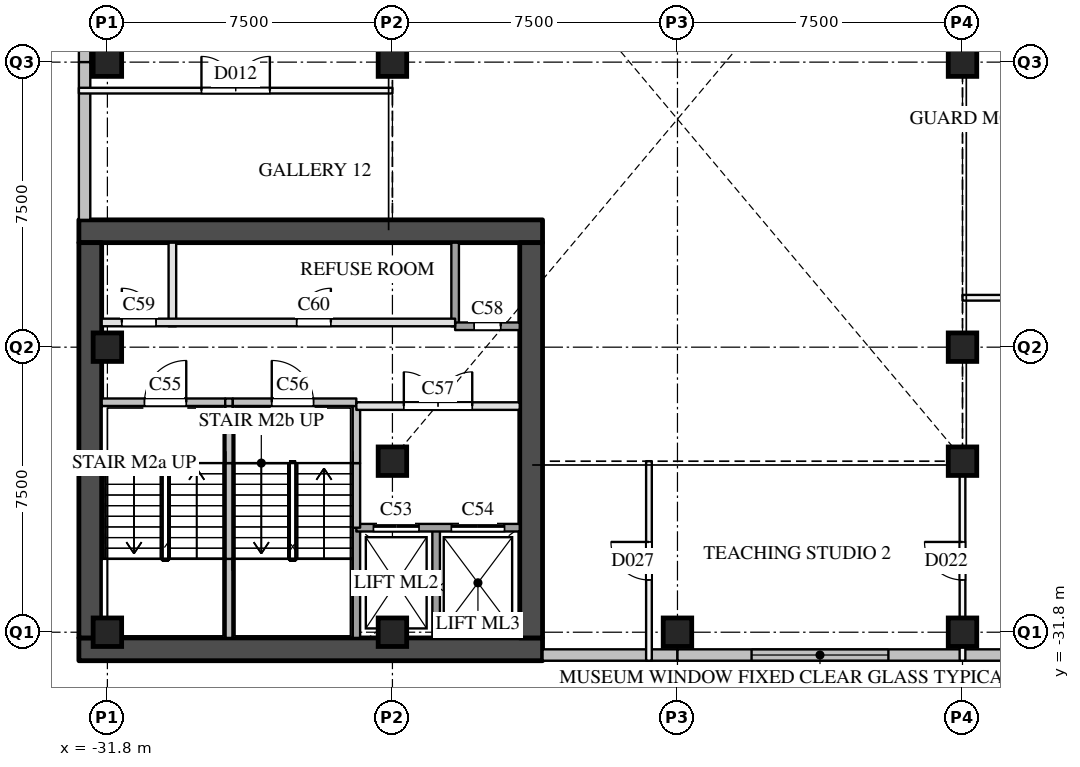
"""IFC4 building model, lengths in metres.
Left out: names, types, materials, properties, quantities, classifications, styles, units other than length and angle.
Written with IfcOpenShell. Run it as: python <this file> out.ifc"""

import sys

from ifc_helpers import new_model, si_unit, direction, frame, frame_2d, origin, origin_2d, place, context, subcontext, project, spatial, rectangle, extrude, element, fill, save


model = new_model("IFC4")
c1 = context("Model", 3, precision=1e-05, world=origin(), true_north=direction((0.0, 1.0)))
c2 = subcontext(c1, "Body", "Model", "MODEL_VIEW")
j1 = project(units=[si_unit("LENGTHUNIT", "METRE"), si_unit("PLANEANGLEUNIT", "RADIAN")], contexts=[c1])
p1 = place(None, origin())
s1 = spatial("IfcSite", under=j1, at=p1, CompositionType="ELEMENT")
p2 = place(p1, origin())
s2 = spatial("IfcBuilding", under=s1, at=p2, CompositionType="ELEMENT")
p3 = place(p2, frame((0.0, 0.0, 14.0)))
s3 = spatial("IfcBuildingStorey", under=s2, at=p3, CompositionType="ELEMENT", Elevation=14.0)
for number, where, z_axis, x_axis in (
    (1, (-31.8, -31.8, 0.0), (0.0, 0.0, 1.0), (1.0, 0.0, 0.0)),
    (2, (-31.8, -24.3, 0.0), (0.0, 0.0, 1.0), (1.0, 0.0, 0.0)),
    (3, (-31.8, -16.8, 0.0), (0.0, 0.0, 1.0), (1.0, 0.0, 0.0)),
    (4, (-24.3, -31.8, 0.0), (0.0, 0.0, 1.0), (1.0, 0.0, 0.0)),
    (5, (-24.3, -16.8, 0.0), (0.0, 0.0, 1.0), (1.0, 0.0, 0.0)),
    (6, (-16.8, -31.8, 0.0), (0.0, 0.0, 1.0), (1.0, 0.0, 0.0)),
    (7, (-9.3, -31.8, 0.0), (0.0, 0.0, 1.0), (1.0, 0.0, 0.0)),
    (8, (-9.3, -24.3, 0.0), (0.0, 0.0, 1.0), (1.0, 0.0, 0.0)),
    (9, (-9.3, -16.8, 0.0), (0.0, 0.0, 1.0), (1.0, 0.0, 0.0)),
    (10, (-24.3, -27.3, 0.0), (0.0, 0.0, 1.0), (1.0, 0.0, 0.0)),
    (11, (-9.3, -27.3, 0.0), (0.0, 0.0, 1.0), (1.0, 0.0, 0.0)),
):
    element("IfcColumn", number, at=place(p3, frame(where, z_axis=z_axis, x_axis=x_axis)), inside=s3, PredefinedType="COLUMN", context=c2, shape_type="SweptSolid", body=[
        extrude(rectangle(XDim=0.75, YDim=0.75, at=origin_2d()), origin(), (0.0, 0.0, 1.0), 7.0),
    ])
p4 = place(p3, frame((-20.35, -32.4, 0.0), z_axis=(0.0, 0.0, 1.0), x_axis=(1.0, 0.0, 0.0)))
e12 = element("IfcWall", 12, at=p4, inside=s3, PredefinedType="SOLIDWALL", context=c2, shape_type="SweptSolid", body=[
    extrude(rectangle(XDim=3.55, YDim=0.3, at=frame_2d((1.775, 0.0))), origin(), (0.0, 0.0, 1.0), 6.59),
])
p5 = place(p3, frame((-16.8, -32.4, 0.0), z_axis=(0.0, 0.0, 1.0), x_axis=(1.0, 0.0, 0.0)))
e13 = element("IfcWall", 13, at=p5, inside=s3, PredefinedType="SOLIDWALL", context=c2, shape_type="SweptSolid", body=[
    extrude(rectangle(XDim=7.5, YDim=0.3, at=frame_2d((3.75, 0.0))), origin(), (0.0, 0.0, 1.0), 6.59),
])
p6 = place(p5, frame((1.95, 0.0, 0.9)))
e14 = element("IfcOpeningElement", 14, at=p6, cuts=e13, PredefinedType="OPENING", context=c2, shape_type="SweptSolid", body=[
    extrude(rectangle(XDim=3.6, YDim=3.0, at=frame_2d((1.8, 1.5))), frame((0.0, 0.16, 0.0), z_axis=(0.0, -1.0, 0.0), x_axis=(1.0, 0.0, 0.0)), (0.0, 0.0, 1.0), 0.32),
])
p7 = place(p3, frame((-9.3, -32.4, 0.0), z_axis=(0.0, 0.0, 1.0), x_axis=(1.0, 0.0, 0.0)))
e15 = element("IfcWall", 15, at=p7, inside=s3, PredefinedType="SOLIDWALL", context=c2, shape_type="SweptSolid", body=[
    extrude(rectangle(XDim=7.5, YDim=0.3, at=frame_2d((3.75, 0.0))), origin(), (0.0, 0.0, 1.0), 6.59),
])
p8 = place(p7, frame((1.95, 0.0, 0.9)))
e16 = element("IfcOpeningElement", 16, at=p8, cuts=e15, PredefinedType="OPENING", context=c2, shape_type="SweptSolid", body=[
    extrude(rectangle(XDim=3.6, YDim=3.0, at=frame_2d((1.8, 1.5))), frame((0.0, 0.16, 0.0), z_axis=(0.0, -1.0, 0.0), x_axis=(1.0, 0.0, 0.0)), (0.0, 0.0, 1.0), 0.32),
])
p9 = place(p3, frame((-32.4, -9.3, 0.0), z_axis=(0.0, 0.0, 1.0), x_axis=(0.0, -1.0, 0.0)))
e17 = element("IfcWall", 17, at=p9, inside=s3, PredefinedType="SOLIDWALL", context=c2, shape_type="SweptSolid", body=[
    extrude(rectangle(XDim=7.5, YDim=0.3, at=frame_2d((3.75, 0.0))), origin(), (0.0, 0.0, 1.0), 6.59),
])
p10 = place(p9, frame((1.95, 0.0, 0.9)))
e18 = element("IfcOpeningElement", 18, at=p10, cuts=e17, PredefinedType="OPENING", context=c2, shape_type="SweptSolid", body=[
    extrude(rectangle(XDim=3.6, YDim=3.0, at=frame_2d((1.8, 1.5))), frame((0.0, 0.16, 0.0), z_axis=(0.0, -1.0, 0.0), x_axis=(1.0, 0.0, 0.0)), (0.0, 0.0, 1.0), 0.32),
])
p11 = place(p3, frame((-32.4, -16.8, 0.0), z_axis=(0.0, 0.0, 1.0), x_axis=(0.0, -1.0, 0.0)))
e19 = element("IfcWall", 19, at=p11, inside=s3, PredefinedType="SOLIDWALL", context=c2, shape_type="SweptSolid", body=[
    extrude(rectangle(XDim=4.15, YDim=0.3, at=frame_2d((2.075, 0.0))), origin(), (0.0, 0.0, 1.0), 6.59),
])
for number, where, z_axis, x_axis in (
    (20, (-32.55, -32.25, 0.0), (0.0, 0.0, 1.0), (1.0, 0.0, 0.0)),
    (21, (-32.55, -21.25, 0.0), (0.0, 0.0, 1.0), (1.0, 0.0, 0.0)),
):
    element("IfcWall", number, at=place(p3, frame(where, z_axis=z_axis, x_axis=x_axis)), inside=s3, PredefinedType="SHEAR", context=c2, shape_type="SweptSolid", body=[
        extrude(rectangle(XDim=12.2, YDim=0.6, at=frame_2d((6.1, 0.0))), origin(), (0.0, 0.0, 1.0), 6.59),
    ])
for number, where, z_axis, x_axis in (
    (22, (-32.25, -31.95, 0.0), (0.0, 0.0, 1.0), (0.0, 1.0, 0.0)),
    (23, (-20.65, -31.95, 0.0), (0.0, 0.0, 1.0), (0.0, 1.0, 0.0)),
):
    element("IfcWall", number, at=place(p3, frame(where, z_axis=z_axis, x_axis=x_axis)), inside=s3, PredefinedType="SHEAR", context=c2, shape_type="SweptSolid", body=[
        extrude(rectangle(XDim=10.4, YDim=0.6, at=frame_2d((5.2, 0.0))), origin(), (0.0, 0.0, 1.0), 6.59),
    ])
p12 = place(p3, frame((-30.09, -23.75, 0.0), z_axis=(0.0, 0.0, 1.0), x_axis=(0.0, 1.0, 0.0)))
e24 = element("IfcWall", 24, at=p12, inside=s3, PredefinedType="PARTITIONING", context=c2, shape_type="SweptSolid", body=[
    extrude(rectangle(XDim=2.2, YDim=0.2, at=frame_2d((1.1, 0.0))), origin(), (0.0, 0.0, 1.0), 6.59),
])
p13 = place(p3, frame((-28.6, -31.95, 0.0), z_axis=(0.0, 0.0, 1.0), x_axis=(0.0, 1.0, 0.0)))
e25 = element("IfcWall", 25, at=p13, inside=s3, PredefinedType="SOLIDWALL", context=c2, shape_type="SweptSolid", body=[
    extrude(rectangle(XDim=2.08, YDim=0.2, at=frame_2d((1.04, 0.0))), origin(), (0.0, 0.0, 1.0), 6.59),
])
p14 = place(p3, frame((-28.6, -29.87, 0.0), z_axis=(0.0, 0.0, 1.0), x_axis=(0.0, 1.0, 0.0)))
e26 = element("IfcWall", 26, at=p14, inside=s3, PredefinedType="SOLIDWALL", context=c2, shape_type="SweptSolid", body=[
    extrude(rectangle(XDim=2.52, YDim=0.2, at=frame_2d((1.26, 0.0))), origin(), (0.0, 0.0, 1.0), 6.59),
])
p15 = place(p3, frame((-28.6, -27.35, 0.0), z_axis=(0.0, 0.0, 1.0), x_axis=(0.0, 1.0, 0.0)))
e27 = element("IfcWall", 27, at=p15, inside=s3, PredefinedType="SOLIDWALL", context=c2, shape_type="SweptSolid", body=[
    extrude(rectangle(XDim=1.6, YDim=0.2, at=frame_2d((0.8, 0.0))), origin(), (0.0, 0.0, 1.0), 6.59),
])
p16 = place(p3, frame((-25.25, -31.95, 0.0), z_axis=(0.0, 0.0, 1.0), x_axis=(0.0, 1.0, 0.0)))
e28 = element("IfcWall", 28, at=p16, inside=s3, PredefinedType="SOLIDWALL", context=c2, shape_type="SweptSolid", body=[
    extrude(rectangle(XDim=2.9, YDim=0.2, at=frame_2d((1.45, 0.0))), origin(), (0.0, 0.0, 1.0), 6.59),
])
p17 = place(p3, frame((-25.25, -29.05, 0.0), z_axis=(0.0, 0.0, 1.0), x_axis=(0.0, 1.0, 0.0)))
e29 = element("IfcWall", 29, at=p17, inside=s3, PredefinedType="SOLIDWALL", context=c2, shape_type="SweptSolid", body=[
    extrude(rectangle(XDim=1.7, YDim=0.2, at=frame_2d((0.85, 0.0))), origin(), (0.0, 0.0, 1.0), 6.59),
])
p18 = place(p3, frame((-25.25, -27.35, 0.0), z_axis=(0.0, 0.0, 1.0), x_axis=(0.0, 1.0, 0.0)))
e30 = element("IfcWall", 30, at=p18, inside=s3, PredefinedType="SOLIDWALL", context=c2, shape_type="SweptSolid", body=[
    extrude(rectangle(XDim=1.6, YDim=0.2, at=frame_2d((0.8, 0.0))), origin(), (0.0, 0.0, 1.0), 6.59),
])
p19 = place(p3, frame((-23.15, -31.95, 0.0), z_axis=(0.0, 0.0, 1.0), x_axis=(0.0, 1.0, 0.0)))
e31 = element("IfcWall", 31, at=p19, inside=s3, PredefinedType="SOLIDWALL", context=c2, shape_type="SweptSolid", body=[
    extrude(rectangle(XDim=2.9, YDim=0.2, at=frame_2d((1.45, 0.0))), origin(), (0.0, 0.0, 1.0), 6.59),
])
p20 = place(p3, frame((-22.65, -23.75, 0.0), z_axis=(0.0, 0.0, 1.0), x_axis=(0.0, 1.0, 0.0)))
e32 = element("IfcWall", 32, at=p20, inside=s3, PredefinedType="SOLIDWALL", context=c2, shape_type="SweptSolid", body=[
    extrude(rectangle(XDim=2.2, YDim=0.2, at=frame_2d((1.1, 0.0))), origin(), (0.0, 0.0, 1.0), 6.59),
])
p21 = place(p3, frame((-25.25, -29.05, 0.0), z_axis=(0.0, 0.0, 1.0), x_axis=(1.0, 0.0, 0.0)))
e33 = element("IfcWall", 33, at=p21, inside=s3, PredefinedType="SOLIDWALL", context=c2, shape_type="SweptSolid", body=[
    extrude(rectangle(XDim=4.3, YDim=0.2, at=frame_2d((2.15, 0.0))), origin(), (0.0, 0.0, 1.0), 6.59),
])
p22 = place(p21, frame((0.45, 0.0, 0.0)))
e34 = element("IfcOpeningElement", 34, at=p22, cuts=e33, PredefinedType="OPENING", context=c2, shape_type="SweptSolid", body=[
    extrude(rectangle(XDim=1.2, YDim=2.1, at=frame_2d((0.6, 1.05))), frame((0.0, 0.11, 0.0), z_axis=(0.0, -1.0, 0.0), x_axis=(1.0, 0.0, 0.0)), (0.0, 0.0, 1.0), 0.22),
])
p23 = place(p21, frame((2.5, 0.0, 0.0)))
e35 = element("IfcOpeningElement", 35, at=p23, cuts=e33, PredefinedType="OPENING", context=c2, shape_type="SweptSolid", body=[
    extrude(rectangle(XDim=1.4, YDim=2.1, at=frame_2d((0.7, 1.05))), frame((0.0, 0.11, 0.0), z_axis=(0.0, -1.0, 0.0), x_axis=(1.0, 0.0, 0.0)), (0.0, 0.0, 1.0), 0.22),
])
p24 = place(p3, frame((-25.25, -25.85, 0.0), z_axis=(0.0, 0.0, 1.0), x_axis=(1.0, 0.0, 0.0)))
e36 = element("IfcWall", 36, at=p24, inside=s3, PredefinedType="PARTITIONING", context=c2, shape_type="SweptSolid", body=[
    extrude(rectangle(XDim=4.3, YDim=0.2, at=frame_2d((2.15, 0.0))), origin(), (0.0, 0.0, 1.0), 6.59),
])
p25 = place(p24, frame((1.25, 0.0, 0.0)))
e37 = element("IfcOpeningElement", 37, at=p25, cuts=e36, PredefinedType="OPENING", context=c2, shape_type="SweptSolid", body=[
    extrude(rectangle(XDim=1.8, YDim=2.1, at=frame_2d((0.9, 1.05))), frame((0.0, 0.11, 0.0), z_axis=(0.0, -1.0, 0.0), x_axis=(1.0, 0.0, 0.0)), (0.0, 0.0, 1.0), 0.22),
])
p26 = place(p3, frame((-31.95, -25.75, 0.0), z_axis=(0.0, 0.0, 1.0), x_axis=(1.0, 0.0, 0.0)))
e38 = element("IfcWall", 38, at=p26, inside=s3, PredefinedType="SOLIDWALL", context=c2, shape_type="SweptSolid", body=[
    extrude(rectangle(XDim=3.25, YDim=0.2, at=frame_2d((1.625, 0.0))), origin(), (0.0, 0.0, 1.0), 6.59),
])
p27 = place(p26, frame((1.125, 0.0, 0.0)))
e39 = element("IfcOpeningElement", 39, at=p27, cuts=e38, PredefinedType="OPENING", context=c2, shape_type="SweptSolid", body=[
    extrude(rectangle(XDim=1.1, YDim=2.1, at=frame_2d((0.55, 1.05))), frame((0.0, 0.11, 0.0), z_axis=(0.0, -1.0, 0.0), x_axis=(1.0, 0.0, 0.0)), (0.0, 0.0, 1.0), 0.22),
])
p28 = place(p3, frame((-28.7, -25.75, 0.0), z_axis=(0.0, 0.0, 1.0), x_axis=(1.0, 0.0, 0.0)))
e40 = element("IfcWall", 40, at=p28, inside=s3, PredefinedType="SOLIDWALL", context=c2, shape_type="SweptSolid", body=[
    extrude(rectangle(XDim=0.2, YDim=0.2, at=frame_2d((0.1, 0.0))), origin(), (0.0, 0.0, 1.0), 6.59),
])
p29 = place(p3, frame((-28.5, -25.75, 0.0), z_axis=(0.0, 0.0, 1.0), x_axis=(1.0, 0.0, 0.0)))
e41 = element("IfcWall", 41, at=p29, inside=s3, PredefinedType="SOLIDWALL", context=c2, shape_type="SweptSolid", body=[
    extrude(rectangle(XDim=3.25, YDim=0.2, at=frame_2d((1.625, 0.0))), origin(), (0.0, 0.0, 1.0), 6.59),
])
p30 = place(p29, frame((1.025, 0.0, 0.0)))
e42 = element("IfcOpeningElement", 42, at=p30, cuts=e41, PredefinedType="OPENING", context=c2, shape_type="SweptSolid", body=[
    extrude(rectangle(XDim=1.1, YDim=2.1, at=frame_2d((0.55, 1.05))), frame((0.0, 0.11, 0.0), z_axis=(0.0, -1.0, 0.0), x_axis=(1.0, 0.0, 0.0)), (0.0, 0.0, 1.0), 0.22),
])
p31 = place(p3, frame((-31.95, -23.65, 0.0), z_axis=(0.0, 0.0, 1.0), x_axis=(1.0, 0.0, 0.0)))
e43 = element("IfcWall", 43, at=p31, inside=s3, PredefinedType="PARTITIONING", context=c2, shape_type="SweptSolid", body=[
    extrude(rectangle(XDim=9.3, YDim=0.2, at=frame_2d((4.65, 0.0))), origin(), (0.0, 0.0, 1.0), 6.59),
])
p32 = place(p31, frame((0.53, 0.0, 0.0)))
e44 = element("IfcOpeningElement", 44, at=p32, cuts=e43, PredefinedType="OPENING", context=c2, shape_type="SweptSolid", body=[
    extrude(rectangle(XDim=0.9, YDim=2.1, at=frame_2d((0.45, 1.05))), frame((0.0, 0.11, 0.0), z_axis=(0.0, -1.0, 0.0), x_axis=(1.0, 0.0, 0.0)), (0.0, 0.0, 1.0), 0.22),
])
p33 = place(p31, frame((5.13, 0.0, 0.0)))
e45 = element("IfcOpeningElement", 45, at=p33, cuts=e43, PredefinedType="OPENING", context=c2, shape_type="SweptSolid", body=[
    extrude(rectangle(XDim=0.9, YDim=2.1, at=frame_2d((0.45, 1.05))), frame((0.0, 0.11, 0.0), z_axis=(0.0, -1.0, 0.0), x_axis=(1.0, 0.0, 0.0)), (0.0, 0.0, 1.0), 0.22),
])
p34 = place(p3, frame((-22.65, -23.75, 0.0), z_axis=(0.0, 0.0, 1.0), x_axis=(1.0, 0.0, 0.0)))
e46 = element("IfcWall", 46, at=p34, inside=s3, PredefinedType="SOLIDWALL", context=c2, shape_type="SweptSolid", body=[
    extrude(rectangle(XDim=1.7, YDim=0.2, at=frame_2d((0.85, 0.0))), origin(), (0.0, 0.0, 1.0), 6.59),
])
p35 = place(p34, frame((0.5, 0.0, 0.0)))
e47 = element("IfcOpeningElement", 47, at=p35, cuts=e46, PredefinedType="OPENING", context=c2, shape_type="SweptSolid", body=[
    extrude(rectangle(XDim=0.7, YDim=2.1, at=frame_2d((0.35, 1.05))), frame((0.0, 0.11, 0.0), z_axis=(0.0, -1.0, 0.0), x_axis=(1.0, 0.0, 0.0)), (0.0, 0.0, 1.0), 0.22),
])
p36 = place(p3, frame((-32.55, -17.55, 0.0), z_axis=(0.0, 0.0, 1.0), x_axis=(1.0, 0.0, 0.0)))
e48 = element("IfcWall", 48, at=p36, inside=s3, PredefinedType="PARTITIONING", context=c2, shape_type="SweptSolid", body=[
    extrude(rectangle(XDim=8.25, YDim=0.15, at=frame_2d((4.125, 0.0))), origin(), (0.0, 0.0, 1.0), 5.79),
])
p37 = place(p36, frame((3.225, 0.0, 0.0)))
e49 = element("IfcOpeningElement", 49, at=p37, cuts=e48, PredefinedType="OPENING", context=c2, shape_type="SweptSolid", body=[
    extrude(rectangle(XDim=1.8, YDim=2.1, at=frame_2d((0.9, 1.05))), frame((0.0, 0.085, 0.0), z_axis=(0.0, -1.0, 0.0), x_axis=(1.0, 0.0, 0.0)), (0.0, 0.0, 1.0), 0.17),
])
p38 = place(p3, frame((-9.3, -23.0, 0.0), z_axis=(0.0, 0.0, 1.0), x_axis=(1.0, 0.0, 0.0)))
e50 = element("IfcWall", 50, at=p38, inside=s3, PredefinedType="PARTITIONING", context=c2, shape_type="SweptSolid", body=[
    extrude(rectangle(XDim=11.0, YDim=0.15, at=frame_2d((5.5, 0.0))), origin(), (0.0, 0.0, 1.0), 5.79),
])
p39 = place(p38, frame((5.0, 0.0, 0.0)))
e51 = element("IfcOpeningElement", 51, at=p39, cuts=e50, PredefinedType="OPENING", context=c2, shape_type="SweptSolid", body=[
    extrude(rectangle(XDim=1.0, YDim=2.1, at=frame_2d((0.5, 1.05))), frame((0.0, 0.085, 0.0), z_axis=(0.0, -1.0, 0.0), x_axis=(1.0, 0.0, 0.0)), (0.0, 0.0, 1.0), 0.17),
])
p40 = place(p3, frame((-17.55, -32.55, 0.0), z_axis=(0.0, 0.0, 1.0), x_axis=(0.0, 1.0, 0.0)))
e52 = element("IfcWall", 52, at=p40, inside=s3, PredefinedType="PARTITIONING", context=c2, shape_type="SweptSolid", body=[
    extrude(rectangle(XDim=5.25, YDim=0.15, at=frame_2d((2.625, 0.0))), origin(), (0.0, 0.0, 1.0), 6.59),
])
p41 = place(p40, frame((2.125, 0.0, 0.0)))
e53 = element("IfcOpeningElement", 53, at=p41, cuts=e52, PredefinedType="OPENING", context=c2, shape_type="SweptSolid", body=[
    extrude(rectangle(XDim=1.0, YDim=2.1, at=frame_2d((0.5, 1.05))), frame((0.0, 0.085, 0.0), z_axis=(0.0, -1.0, 0.0), x_axis=(1.0, 0.0, 0.0)), (0.0, 0.0, 1.0), 0.17),
])
p42 = place(p3, frame((-9.3, -32.55, 0.0), z_axis=(0.0, 0.0, 1.0), x_axis=(0.0, 1.0, 0.0)))
e54 = element("IfcWall", 54, at=p42, inside=s3, PredefinedType="PARTITIONING", context=c2, shape_type="SweptSolid", body=[
    extrude(rectangle(XDim=5.25, YDim=0.15, at=frame_2d((2.625, 0.0))), origin(), (0.0, 0.0, 1.0), 5.79),
])
p43 = place(p42, frame((2.125, 0.0, 0.0)))
e55 = element("IfcOpeningElement", 55, at=p43, cuts=e54, PredefinedType="OPENING", context=c2, shape_type="SweptSolid", body=[
    extrude(rectangle(XDim=1.0, YDim=2.1, at=frame_2d((0.5, 1.05))), frame((0.0, 0.085, 0.0), z_axis=(0.0, -1.0, 0.0), x_axis=(1.0, 0.0, 0.0)), (0.0, 0.0, 1.0), 0.17),
])
p44 = place(p6, origin())
e56 = element("IfcWindow", 56, at=p44, inside=s3, PartitioningType="SINGLE_PANEL", PredefinedType="WINDOW", context=c2, shape_type="SweptSolid", body=[
    extrude(rectangle(XDim=3.6, YDim=3.0, at=frame_2d((1.8, 1.5))), frame((0.0, 0.03, 0.0), z_axis=(0.0, -1.0, 0.0), x_axis=(1.0, 0.0, 0.0)), (0.0, 0.0, 1.0), 0.06),
])
fill(e14, e56)
p45 = place(p22, origin())
e57 = element("IfcDoor", 57, at=p45, inside=s3, OperationType="SLIDING_TO_LEFT", PredefinedType="DOOR", context=c2, shape_type="SweptSolid", body=[
    extrude(rectangle(XDim=1.2, YDim=2.1, at=frame_2d((0.6, 1.05))), frame((0.0, 0.025, 0.0), z_axis=(0.0, -1.0, 0.0), x_axis=(1.0, 0.0, 0.0)), (0.0, 0.0, 1.0), 0.05),
])
fill(e34, e57)
p46 = place(p23, origin())
e58 = element("IfcDoor", 58, at=p46, inside=s3, OperationType="SLIDING_TO_LEFT", PredefinedType="DOOR", context=c2, shape_type="SweptSolid", body=[
    extrude(rectangle(XDim=1.4, YDim=2.1, at=frame_2d((0.7, 1.05))), frame((0.0, 0.025, 0.0), z_axis=(0.0, -1.0, 0.0), x_axis=(1.0, 0.0, 0.0)), (0.0, 0.0, 1.0), 0.05),
])
fill(e35, e58)
p47 = place(p27, origin())
e59 = element("IfcDoor", 59, at=p47, inside=s3, OperationType="SINGLE_SWING_RIGHT", PredefinedType="DOOR", context=c2, shape_type="SweptSolid", body=[
    extrude(rectangle(XDim=1.1, YDim=2.1, at=frame_2d((0.55, 1.05))), frame((0.0, 0.025, 0.0), z_axis=(0.0, -1.0, 0.0), x_axis=(1.0, 0.0, 0.0)), (0.0, 0.0, 1.0), 0.05),
])
fill(e39, e59)
p48 = place(p30, origin())
e60 = element("IfcDoor", 60, at=p48, inside=s3, OperationType="SINGLE_SWING_LEFT", PredefinedType="DOOR", context=c2, shape_type="SweptSolid", body=[
    extrude(rectangle(XDim=1.1, YDim=2.1, at=frame_2d((0.55, 1.05))), frame((0.0, 0.025, 0.0), z_axis=(0.0, -1.0, 0.0), x_axis=(1.0, 0.0, 0.0)), (0.0, 0.0, 1.0), 0.05),
])
fill(e42, e60)
p49 = place(p25, origin())
e61 = element("IfcDoor", 61, at=p49, inside=s3, OperationType="DOUBLE_DOOR_SINGLE_SWING", PredefinedType="DOOR", context=c2, shape_type="SweptSolid", body=[
    extrude(rectangle(XDim=1.8, YDim=2.1, at=frame_2d((0.9, 1.05))), frame((0.0, 0.025, 0.0), z_axis=(0.0, -1.0, 0.0), x_axis=(1.0, 0.0, 0.0)), (0.0, 0.0, 1.0), 0.05),
])
fill(e37, e61)
p50 = place(p35, origin())
e62 = element("IfcDoor", 62, at=p50, inside=s3, OperationType="SINGLE_SWING_RIGHT", PredefinedType="DOOR", context=c2, shape_type="SweptSolid", body=[
    extrude(rectangle(XDim=0.7, YDim=2.1, at=frame_2d((0.35, 1.05))), frame((0.0, 0.025, 0.0), z_axis=(0.0, -1.0, 0.0), x_axis=(1.0, 0.0, 0.0)), (0.0, 0.0, 1.0), 0.05),
])
fill(e47, e62)
p51 = place(p32, origin())
e63 = element("IfcDoor", 63, at=p51, inside=s3, OperationType="SINGLE_SWING_LEFT", PredefinedType="DOOR", context=c2, shape_type="SweptSolid", body=[
    extrude(rectangle(XDim=0.9, YDim=2.1, at=frame_2d((0.45, 1.05))), frame((0.0, 0.025, 0.0), z_axis=(0.0, -1.0, 0.0), x_axis=(1.0, 0.0, 0.0)), (0.0, 0.0, 1.0), 0.05),
])
fill(e44, e63)
p52 = place(p33, origin())
e64 = element("IfcDoor", 64, at=p52, inside=s3, OperationType="SINGLE_SWING_RIGHT", PredefinedType="DOOR", context=c2, shape_type="SweptSolid", body=[
    extrude(rectangle(XDim=0.9, YDim=2.1, at=frame_2d((0.45, 1.05))), frame((0.0, 0.025, 0.0), z_axis=(0.0, -1.0, 0.0), x_axis=(1.0, 0.0, 0.0)), (0.0, 0.0, 1.0), 0.05),
])
fill(e45, e64)
p53 = place(p37, origin())
e65 = element("IfcDoor", 65, at=p53, inside=s3, OperationType="DOUBLE_DOOR_SINGLE_SWING", PredefinedType="DOOR", context=c2, shape_type="SweptSolid", body=[
    extrude(rectangle(XDim=1.8, YDim=2.1, at=frame_2d((0.9, 1.05))), frame((0.0, 0.025, 0.0), z_axis=(0.0, -1.0, 0.0), x_axis=(1.0, 0.0, 0.0)), (0.0, 0.0, 1.0), 0.05),
])
fill(e49, e65)
p54 = place(p43, origin())
e66 = element("IfcDoor", 66, at=p54, inside=s3, OperationType="SINGLE_SWING_RIGHT", PredefinedType="DOOR", context=c2, shape_type="SweptSolid", body=[
    extrude(rectangle(XDim=1.0, YDim=2.1, at=frame_2d((0.5, 1.05))), frame((0.0, 0.025, 0.0), z_axis=(0.0, -1.0, 0.0), x_axis=(1.0, 0.0, 0.0)), (0.0, 0.0, 1.0), 0.05),
])
fill(e55, e66)
p55 = place(p41, origin())
e67 = element("IfcDoor", 67, at=p55, inside=s3, OperationType="SINGLE_SWING_RIGHT", PredefinedType="DOOR", context=c2, shape_type="SweptSolid", body=[
    extrude(rectangle(XDim=1.0, YDim=2.1, at=frame_2d((0.5, 1.05))), frame((0.0, 0.025, 0.0), z_axis=(0.0, -1.0, 0.0), x_axis=(1.0, 0.0, 0.0)), (0.0, 0.0, 1.0), 0.05),
])
fill(e53, e67)
save(model, sys.argv[1])
